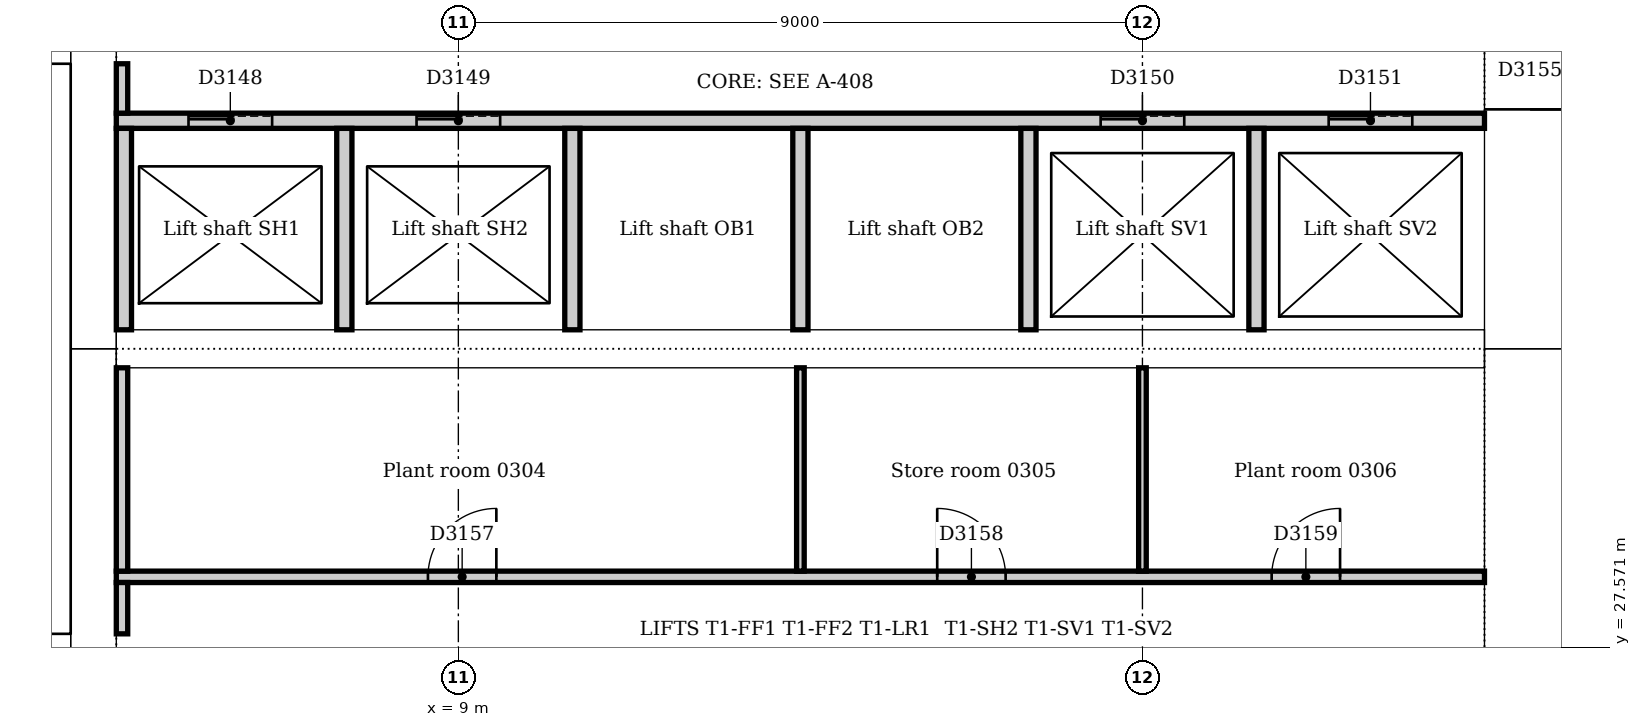
"""IFC4 building model, lengths in metres.
Left out: names, types, materials, properties, quantities, classifications, styles, units other than length and angle.
Written with IfcOpenShell. Run it as: python <this file> out.ifc"""

import sys

from ifc_helpers import new_model, si_unit, direction, frame, frame_2d, origin, place, context, subcontext, project, spatial, rectangle, extrude, element, fill, save


model = new_model("IFC4")
c1 = context("Model", 3, precision=1e-05, world=origin(), true_north=direction((0.0, 1.0)))
c2 = subcontext(c1, "Body", "Model", "MODEL_VIEW")
j1 = project(units=[si_unit("LENGTHUNIT", "METRE"), si_unit("PLANEANGLEUNIT", "RADIAN")], contexts=[c1])
p1 = place(None, origin())
s1 = spatial("IfcSite", under=j1, at=p1, CompositionType="ELEMENT")
p2 = place(p1, origin())
s2 = spatial("IfcBuilding", under=s1, at=p2, CompositionType="ELEMENT")
p3 = place(p2, frame((0.0, 0.0, 16.0)))
s3 = spatial("IfcBuildingStorey", under=s2, at=p3, CompositionType="ELEMENT", Elevation=16.0)
p4 = place(p3, frame((23.1, 21.0, 0.0), z_axis=(0.0, 0.0, 1.0), x_axis=(0.0, 1.0, 0.0)))
e1 = element("IfcWall", 1, at=p4, inside=s3, PredefinedType="SOLIDWALL", context=c2, shape_type="SweptSolid", body=[
    extrude(rectangle(XDim=10.5, YDim=1.2, at=frame_2d((5.25, 0.0))), origin(), (0.0, 0.0, 1.0), 5.0),
])
p5 = place(p4, frame((4.35, 0.0, 0.0)))
e2 = element("IfcOpeningElement", 2, at=p5, cuts=e1, PredefinedType="OPENING", context=c2, shape_type="SweptSolid", body=[
    extrude(rectangle(XDim=1.8, YDim=2.1, at=frame_2d((0.9, 1.05))), frame((0.0, 0.61, 0.0), z_axis=(0.0, -1.0, 0.0), x_axis=(1.0, 0.0, 0.0)), (0.0, 0.0, 1.0), 1.22),
])
p6 = place(p3, frame((23.1, 31.5, 0.0), z_axis=(0.0, 0.0, 1.0), x_axis=(0.0, 1.0, 0.0)))
e3 = element("IfcWall", 3, at=p6, inside=s3, PredefinedType="SOLIDWALL", context=c2, shape_type="SweptSolid", body=[
    extrude(rectangle(XDim=10.5, YDim=1.2, at=frame_2d((5.25, 0.0))), origin(), (0.0, 0.0, 1.0), 5.0),
])
p7 = place(p6, frame((3.15, 0.0, 0.0)))
e4 = element("IfcOpeningElement", 4, at=p7, cuts=e3, PredefinedType="OPENING", context=c2, shape_type="SweptSolid", body=[
    extrude(rectangle(XDim=1.0, YDim=2.1, at=frame_2d((0.5, 1.05))), frame((0.0, 0.61, 0.0), z_axis=(0.0, -1.0, 0.0), x_axis=(1.0, 0.0, 0.0)), (0.0, 0.0, 1.0), 1.22),
])
p8 = place(p6, frame((5.2, 0.0, 0.0)))
e5 = element("IfcOpeningElement", 5, at=p8, cuts=e3, PredefinedType="OPENING", context=c2, shape_type="SweptSolid", body=[
    extrude(rectangle(XDim=1.0, YDim=2.1, at=frame_2d((0.5, 1.05))), frame((0.0, 0.61, 0.0), z_axis=(0.0, -1.0, 0.0), x_axis=(1.0, 0.0, 0.0)), (0.0, 0.0, 1.0), 1.22),
])
p9 = place(p3, frame((4.2, 42.0, 0.0), z_axis=(0.0, 0.0, 1.0), x_axis=(0.0, -1.0, 0.0)))
e6 = element("IfcWall", 6, at=p9, inside=s3, PredefinedType="SOLIDWALL", context=c2, shape_type="SweptSolid", body=[
    extrude(rectangle(XDim=10.5, YDim=0.6, at=frame_2d((5.25, 0.0))), origin(), (0.0, 0.0, 1.0), 5.0),
])
p10 = place(p9, frame((5.3, 0.0, 0.0)))
e7 = element("IfcOpeningElement", 7, at=p10, cuts=e6, PredefinedType="OPENING", context=c2, shape_type="SweptSolid", body=[
    extrude(rectangle(XDim=1.0, YDim=2.1, at=frame_2d((0.5, 1.05))), frame((0.0, 0.31, 0.0), z_axis=(0.0, -1.0, 0.0), x_axis=(1.0, 0.0, 0.0)), (0.0, 0.0, 1.0), 0.62),
])
p11 = place(p3, frame((4.2, 31.5, 0.0), z_axis=(0.0, 0.0, 1.0), x_axis=(0.0, -1.0, 0.0)))
e8 = element("IfcWall", 8, at=p11, inside=s3, PredefinedType="SOLIDWALL", context=c2, shape_type="SweptSolid", body=[
    extrude(rectangle(XDim=10.5, YDim=0.6, at=frame_2d((5.25, 0.0))), origin(), (0.0, 0.0, 1.0), 5.0),
])
p12 = place(p11, frame((4.25, 0.0, 0.0)))
e9 = element("IfcOpeningElement", 9, at=p12, cuts=e8, PredefinedType="OPENING", context=c2, shape_type="SweptSolid", body=[
    extrude(rectangle(XDim=1.0, YDim=2.1, at=frame_2d((0.5, 1.05))), frame((0.0, 0.31, 0.0), z_axis=(0.0, -1.0, 0.0), x_axis=(1.0, 0.0, 0.0)), (0.0, 0.0, 1.0), 0.62),
])
p13 = place(p3, frame((4.5, 31.5, 0.0), z_axis=(0.0, 0.0, 1.0), x_axis=(1.0, 0.0, 0.0)))
e10 = element("IfcWall", 10, at=p13, inside=s3, PredefinedType="SOLIDWALL", context=c2, shape_type="SweptSolid", body=[
    extrude(rectangle(XDim=18.0, YDim=0.5, at=frame_2d((9.0, 0.0))), origin(), (0.0, 0.0, 1.0), 5.0),
])
p14 = place(p3, frame((3.9, 27.625, 0.0), z_axis=(0.0, 0.0, 1.0), x_axis=(-1.0, 0.0, 0.0)))
e11 = element("IfcWall", 11, at=p14, inside=s3, PredefinedType="SOLIDWALL", context=c2, shape_type="SweptSolid", body=[
    extrude(rectangle(XDim=3.54, YDim=0.25, at=frame_2d((1.77, 0.0))), origin(), (0.0, 0.0, 1.0), 5.0),
])
p15 = place(p14, frame((0.4, 0.0, 0.0)))
e12 = element("IfcOpeningElement", 12, at=p15, cuts=e11, PredefinedType="OPENING", context=c2, shape_type="SweptSolid", body=[
    extrude(rectangle(XDim=1.0, YDim=2.1, at=frame_2d((0.5, 1.05))), frame((0.0, 0.135, 0.0), z_axis=(0.0, -1.0, 0.0), x_axis=(1.0, 0.0, 0.0)), (0.0, 0.0, 1.0), 0.27),
])
p16 = place(p3, frame((0.36, 35.375, 0.0), z_axis=(0.0, 0.0, 1.0), x_axis=(1.0, 0.0, 0.0)))
e13 = element("IfcWall", 13, at=p16, inside=s3, PredefinedType="SOLIDWALL", context=c2, shape_type="SweptSolid", body=[
    extrude(rectangle(XDim=3.54, YDim=0.25, at=frame_2d((1.77, 0.0))), origin(), (0.0, 0.0, 1.0), 5.0),
])
p17 = place(p16, frame((2.14, 0.0, 0.0)))
e14 = element("IfcOpeningElement", 14, at=p17, cuts=e13, PredefinedType="OPENING", context=c2, shape_type="SweptSolid", body=[
    extrude(rectangle(XDim=1.0, YDim=2.1, at=frame_2d((0.5, 1.05))), frame((0.0, 0.135, 0.0), z_axis=(0.0, -1.0, 0.0), x_axis=(1.0, 0.0, 0.0)), (0.0, 0.0, 1.0), 0.27),
])
p18 = place(p3, frame((4.5, 34.5, 0.0), z_axis=(0.0, 0.0, 1.0), x_axis=(1.0, 0.0, 0.0)))
e15 = element("IfcWall", 15, at=p18, inside=s3, PredefinedType="PARTITIONING", context=c2, shape_type="SweptSolid", body=[
    extrude(rectangle(XDim=18.0, YDim=0.2, at=frame_2d((9.0, 0.0))), origin(), (0.0, 0.0, 1.0), 4.7),
])
p19 = place(p18, frame((0.95, 0.0, 0.0)))
e16 = element("IfcOpeningElement", 16, at=p19, cuts=e15, PredefinedType="OPENING", context=c2, shape_type="SweptSolid", body=[
    extrude(rectangle(XDim=1.1, YDim=2.1, at=frame_2d((0.55, 1.05))), frame((0.0, 0.11, 0.0), z_axis=(0.0, -1.0, 0.0), x_axis=(1.0, 0.0, 0.0)), (0.0, 0.0, 1.0), 0.22),
])
p20 = place(p18, frame((3.95, 0.0, 0.0)))
e17 = element("IfcOpeningElement", 17, at=p20, cuts=e15, PredefinedType="OPENING", context=c2, shape_type="SweptSolid", body=[
    extrude(rectangle(XDim=1.1, YDim=2.1, at=frame_2d((0.55, 1.05))), frame((0.0, 0.11, 0.0), z_axis=(0.0, -1.0, 0.0), x_axis=(1.0, 0.0, 0.0)), (0.0, 0.0, 1.0), 0.22),
])
p21 = place(p18, frame((12.95, 0.0, 0.0)))
e18 = element("IfcOpeningElement", 18, at=p21, cuts=e15, PredefinedType="OPENING", context=c2, shape_type="SweptSolid", body=[
    extrude(rectangle(XDim=1.1, YDim=2.1, at=frame_2d((0.55, 1.05))), frame((0.0, 0.11, 0.0), z_axis=(0.0, -1.0, 0.0), x_axis=(1.0, 0.0, 0.0)), (0.0, 0.0, 1.0), 0.22),
])
p22 = place(p18, frame((15.95, 0.0, 0.0)))
e19 = element("IfcOpeningElement", 19, at=p22, cuts=e15, PredefinedType="OPENING", context=c2, shape_type="SweptSolid", body=[
    extrude(rectangle(XDim=1.1, YDim=2.1, at=frame_2d((0.55, 1.05))), frame((0.0, 0.11, 0.0), z_axis=(0.0, -1.0, 0.0), x_axis=(1.0, 0.0, 0.0)), (0.0, 0.0, 1.0), 0.22),
])
for number, where, z_axis, x_axis in (
    (20, (4.6, 31.75, 0.0), (0.0, 0.0, 1.0), (0.0, 1.0, 0.0)),
    (21, (7.5, 31.75, 0.0), (0.0, 0.0, 1.0), (0.0, 1.0, 0.0)),
    (22, (10.5, 31.75, 0.0), (0.0, 0.0, 1.0), (0.0, 1.0, 0.0)),
    (23, (13.5, 31.75, 0.0), (0.0, 0.0, 1.0), (0.0, 1.0, 0.0)),
    (24, (16.5, 31.75, 0.0), (0.0, 0.0, 1.0), (0.0, 1.0, 0.0)),
    (25, (19.5, 31.75, 0.0), (0.0, 0.0, 1.0), (0.0, 1.0, 0.0)),
):
    element("IfcWall", number, at=place(p3, frame(where, z_axis=z_axis, x_axis=x_axis)), inside=s3, PredefinedType="PARTITIONING", context=c2, shape_type="SweptSolid", body=[
        extrude(rectangle(XDim=2.65, YDim=0.2, at=frame_2d((1.325, 0.0))), origin(), (0.0, 0.0, 1.0), 4.7),
    ])
p23 = place(p3, frame((4.5, 28.5, 0.0), z_axis=(0.0, 0.0, 1.0), x_axis=(1.0, 0.0, 0.0)))
e26 = element("IfcWall", 26, at=p23, inside=s3, PredefinedType="PARTITIONING", context=c2, shape_type="SweptSolid", body=[
    extrude(rectangle(XDim=18.0, YDim=0.15, at=frame_2d((9.0, 0.0))), origin(), (0.0, 0.0, 1.0), 4.7),
])
p24 = place(p23, frame((4.1, 0.0, 0.0)))
e27 = element("IfcOpeningElement", 27, at=p24, cuts=e26, PredefinedType="OPENING", context=c2, shape_type="SweptSolid", body=[
    extrude(rectangle(XDim=0.9, YDim=2.1, at=frame_2d((0.45, 1.05))), frame((0.0, 0.085, 0.0), z_axis=(0.0, -1.0, 0.0), x_axis=(1.0, 0.0, 0.0)), (0.0, 0.0, 1.0), 0.17),
])
p25 = place(p23, frame((10.8, 0.0, 0.0)))
e28 = element("IfcOpeningElement", 28, at=p25, cuts=e26, PredefinedType="OPENING", context=c2, shape_type="SweptSolid", body=[
    extrude(rectangle(XDim=0.9, YDim=2.1, at=frame_2d((0.45, 1.05))), frame((0.0, 0.085, 0.0), z_axis=(0.0, -1.0, 0.0), x_axis=(1.0, 0.0, 0.0)), (0.0, 0.0, 1.0), 0.17),
])
p26 = place(p23, frame((15.2, 0.0, 0.0)))
e29 = element("IfcOpeningElement", 29, at=p26, cuts=e26, PredefinedType="OPENING", context=c2, shape_type="SweptSolid", body=[
    extrude(rectangle(XDim=0.9, YDim=2.1, at=frame_2d((0.45, 1.05))), frame((0.0, 0.085, 0.0), z_axis=(0.0, -1.0, 0.0), x_axis=(1.0, 0.0, 0.0)), (0.0, 0.0, 1.0), 0.17),
])
p27 = place(p3, frame((4.575, 27.75, 0.0), z_axis=(0.0, 0.0, 1.0), x_axis=(0.0, 1.0, 0.0)))
e30 = element("IfcWall", 30, at=p27, inside=s3, PredefinedType="PARTITIONING", context=c2, shape_type="SweptSolid", body=[
    extrude(rectangle(XDim=0.675, YDim=0.15, at=frame_2d((0.338, 0.0))), origin(), (0.0, 0.0, 1.0), 4.7),
])
p28 = place(p3, frame((4.575, 28.575, 0.0), z_axis=(0.0, 0.0, 1.0), x_axis=(0.0, 1.0, 0.0)))
e31 = element("IfcWall", 31, at=p28, inside=s3, PredefinedType="PARTITIONING", context=c2, shape_type="SweptSolid", body=[
    extrude(rectangle(XDim=2.675, YDim=0.15, at=frame_2d((1.337, 0.0))), origin(), (0.0, 0.0, 1.0), 4.7),
])
p29 = place(p3, frame((4.575, 34.6, 0.0), z_axis=(0.0, 0.0, 1.0), x_axis=(0.0, 1.0, 0.0)))
e32 = element("IfcWall", 32, at=p29, inside=s3, PredefinedType="PARTITIONING", context=c2, shape_type="SweptSolid", body=[
    extrude(rectangle(XDim=0.65, YDim=0.15, at=frame_2d((0.325, 0.0))), origin(), (0.0, 0.0, 1.0), 4.7),
])
for number, where, z_axis, x_axis in (
    (33, (13.5, 28.575, 0.0), (0.0, 0.0, 1.0), (0.0, 1.0, 0.0)),
    (34, (18.0, 28.575, 0.0), (0.0, 0.0, 1.0), (0.0, 1.0, 0.0)),
):
    element("IfcWall", number, at=place(p3, frame(where, z_axis=z_axis, x_axis=x_axis)), inside=s3, PredefinedType="PARTITIONING", context=c2, shape_type="SweptSolid", body=[
        extrude(rectangle(XDim=2.675, YDim=0.1, at=frame_2d((1.337, 0.0))), origin(), (0.0, 0.0, 1.0), 4.7),
    ])
p30 = place(p19, origin())
e35 = element("IfcDoor", 35, at=p30, inside=s3, OperationType="SLIDING_TO_LEFT", PredefinedType="DOOR", context=c2, shape_type="SweptSolid", body=[
    extrude(rectangle(XDim=1.1, YDim=2.1, at=frame_2d((0.55, 1.05))), frame((0.0, 0.025, 0.0), z_axis=(0.0, -1.0, 0.0), x_axis=(1.0, 0.0, 0.0)), (0.0, 0.0, 1.0), 0.05),
])
fill(e16, e35)
p31 = place(p20, origin())
e36 = element("IfcDoor", 36, at=p31, inside=s3, OperationType="SLIDING_TO_LEFT", PredefinedType="DOOR", context=c2, shape_type="SweptSolid", body=[
    extrude(rectangle(XDim=1.1, YDim=2.1, at=frame_2d((0.55, 1.05))), frame((0.0, 0.025, 0.0), z_axis=(0.0, -1.0, 0.0), x_axis=(1.0, 0.0, 0.0)), (0.0, 0.0, 1.0), 0.05),
])
fill(e17, e36)
p32 = place(p21, origin())
e37 = element("IfcDoor", 37, at=p32, inside=s3, OperationType="SLIDING_TO_LEFT", PredefinedType="DOOR", context=c2, shape_type="SweptSolid", body=[
    extrude(rectangle(XDim=1.1, YDim=2.1, at=frame_2d((0.55, 1.05))), frame((0.0, 0.025, 0.0), z_axis=(0.0, -1.0, 0.0), x_axis=(1.0, 0.0, 0.0)), (0.0, 0.0, 1.0), 0.05),
])
fill(e18, e37)
p33 = place(p22, origin())
e38 = element("IfcDoor", 38, at=p33, inside=s3, OperationType="SLIDING_TO_LEFT", PredefinedType="DOOR", context=c2, shape_type="SweptSolid", body=[
    extrude(rectangle(XDim=1.1, YDim=2.1, at=frame_2d((0.55, 1.05))), frame((0.0, 0.025, 0.0), z_axis=(0.0, -1.0, 0.0), x_axis=(1.0, 0.0, 0.0)), (0.0, 0.0, 1.0), 0.05),
])
fill(e19, e38)
p34 = place(p7, frame((1.0, 0.0, 0.0), z_axis=(0.0, 0.0, 1.0), x_axis=(-1.0, 0.0, 0.0)))
e39 = element("IfcDoor", 39, at=p34, inside=s3, OperationType="SINGLE_SWING_RIGHT", PredefinedType="DOOR", context=c2, shape_type="SweptSolid", body=[
    extrude(rectangle(XDim=1.0, YDim=2.1, at=frame_2d((0.5, 1.05))), frame((0.0, 0.025, 0.0), z_axis=(0.0, -1.0, 0.0), x_axis=(1.0, 0.0, 0.0)), (0.0, 0.0, 1.0), 0.05),
])
fill(e4, e39)
p35 = place(p24, origin())
e40 = element("IfcDoor", 40, at=p35, inside=s3, OperationType="SINGLE_SWING_RIGHT", PredefinedType="DOOR", context=c2, shape_type="SweptSolid", body=[
    extrude(rectangle(XDim=0.9, YDim=2.1, at=frame_2d((0.45, 1.05))), frame((0.0, 0.025, 0.0), z_axis=(0.0, -1.0, 0.0), x_axis=(1.0, 0.0, 0.0)), (0.0, 0.0, 1.0), 0.05),
])
fill(e27, e40)
p36 = place(p25, origin())
e41 = element("IfcDoor", 41, at=p36, inside=s3, OperationType="SINGLE_SWING_LEFT", PredefinedType="DOOR", context=c2, shape_type="SweptSolid", body=[
    extrude(rectangle(XDim=0.9, YDim=2.1, at=frame_2d((0.45, 1.05))), frame((0.0, 0.025, 0.0), z_axis=(0.0, -1.0, 0.0), x_axis=(1.0, 0.0, 0.0)), (0.0, 0.0, 1.0), 0.05),
])
fill(e28, e41)
p37 = place(p26, origin())
e42 = element("IfcDoor", 42, at=p37, inside=s3, OperationType="SINGLE_SWING_RIGHT", PredefinedType="DOOR", context=c2, shape_type="SweptSolid", body=[
    extrude(rectangle(XDim=0.9, YDim=2.1, at=frame_2d((0.45, 1.05))), frame((0.0, 0.025, 0.0), z_axis=(0.0, -1.0, 0.0), x_axis=(1.0, 0.0, 0.0)), (0.0, 0.0, 1.0), 0.05),
])
fill(e29, e42)
save(model, sys.argv[1])
